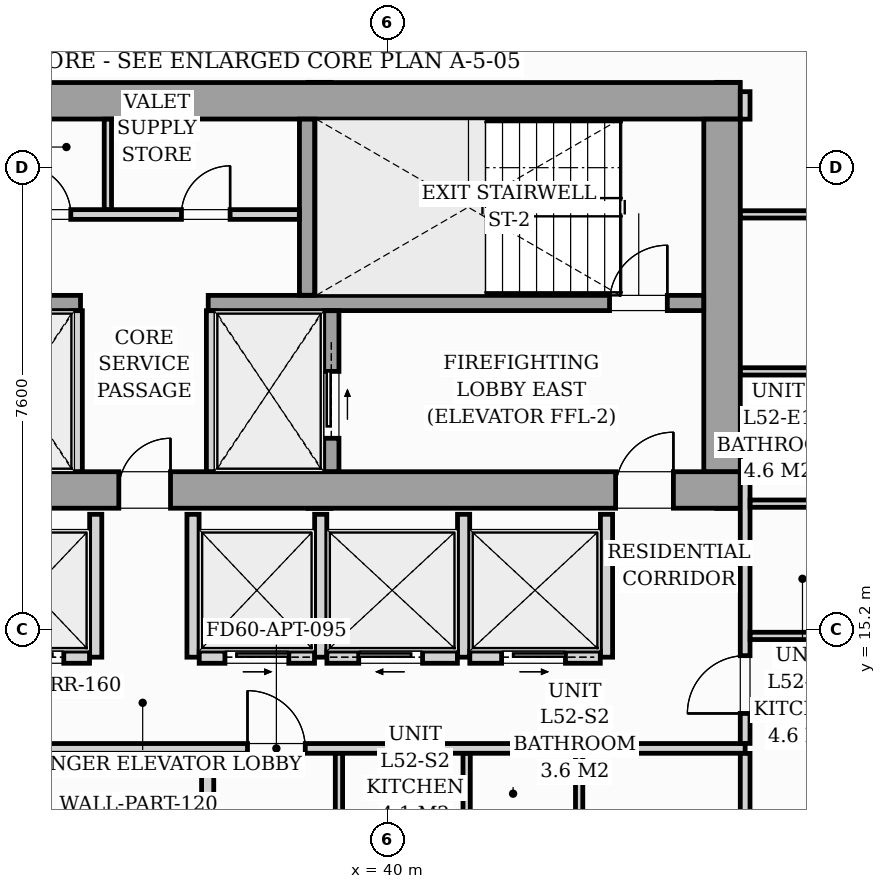
"""IFC4 building model, lengths in metres.
Left out: names, types, materials, properties, quantities, classifications, styles, units other than length and angle.
Written with IfcOpenShell. Run it as: python <this file> out.ifc"""

import sys

from ifc_helpers import new_model, si_unit, direction, frame, frame_2d, origin, origin_2d, place, context, subcontext, project, spatial, rectangle, i_section, extrude, source, transform, mapped, element, fill, save


model = new_model("IFC4")
c1 = context("Model", 3, precision=1e-05, world=origin(), true_north=direction((0.0, 1.0)))
c2 = subcontext(c1, "Body", "Model", "MODEL_VIEW")
j1 = project(units=[si_unit("LENGTHUNIT", "METRE"), si_unit("PLANEANGLEUNIT", "RADIAN")], contexts=[c1])
p1 = place(None, origin())
s1 = spatial("IfcSite", under=j1, at=p1, CompositionType="ELEMENT")
p2 = place(p1, origin())
s2 = spatial("IfcBuilding", under=s1, at=p2, CompositionType="ELEMENT")
p3 = place(p2, frame((0.0, 0.0, 182.6)))
s3 = spatial("IfcBuildingStorey", under=s2, at=p3, CompositionType="ELEMENT", Elevation=182.6)
m1 = source(origin(), c2, "Body", "SweptSolid", [
    extrude(i_section(OverallWidth=0.416, OverallDepth=0.446, WebThickness=0.039, FlangeThickness=0.063, FilletRadius=0.018, at=origin_2d()), origin(), (0.0, 0.0, 1.0), 3.196),
])
for number, where, z_axis, x_axis in (
    (1, (38.88, 17.4, 0.002), (0.0, 0.0, 1.0), (1.0, 0.0, 0.0)),
    (2, (45.6, 17.4, 0.002), (0.0, 0.0, 1.0), (1.0, 0.0, 0.0)),
    (3, (38.88, 24.0, 0.002), (0.0, 0.0, 1.0), (1.0, 0.0, 0.0)),
    (4, (45.6, 24.0, 0.002), (0.0, 0.0, 1.0), (1.0, 0.0, 0.0)),
):
    element("IfcColumn", number, at=place(p3, frame(where, z_axis=z_axis, x_axis=x_axis)), inside=s3, PredefinedType="PILASTER", context=c2, shape_type="MappedRepresentation", body=[
        mapped(m1, transform((0.0, 0.0, 0.0), scale=1.0)),
    ])
p4 = place(p3, frame((26.2, 17.5, 0.0), z_axis=(0.0, 0.0, 1.0), x_axis=(1.0, 0.0, 0.0)))
e5 = element("IfcWall", 5, at=p4, inside=s3, PredefinedType="SHEAR", context=c2, shape_type="SweptSolid", body=[
    extrude(rectangle(XDim=19.6, YDim=0.6, at=frame_2d((9.8, 0.0))), origin(), (0.0, 0.0, 1.0), 3.2),
])
p5 = place(p4, frame((0.95, 0.0, 0.0)))
e6 = element("IfcOpeningElement", 6, at=p5, cuts=e5, PredefinedType="OPENING", context=c2, shape_type="SweptSolid", body=[
    extrude(rectangle(XDim=0.95, YDim=2.06, at=frame_2d((0.475, 1.03))), frame((0.0, 0.31, 0.0), z_axis=(0.0, -1.0, 0.0), x_axis=(1.0, 0.0, 0.0)), (0.0, 0.0, 1.0), 0.62),
])
p6 = place(p4, frame((9.38, 0.0, 0.0)))
e7 = element("IfcOpeningElement", 7, at=p6, cuts=e5, PredefinedType="OPENING", context=c2, shape_type="SweptSolid", body=[
    extrude(rectangle(XDim=0.85, YDim=2.0, at=frame_2d((0.425, 1.0))), frame((0.0, 0.31, 0.0), z_axis=(0.0, -1.0, 0.0), x_axis=(1.0, 0.0, 0.0)), (0.0, 0.0, 1.0), 0.62),
])
p7 = place(p4, frame((17.55, 0.0, 0.0)))
e8 = element("IfcOpeningElement", 8, at=p7, cuts=e5, PredefinedType="OPENING", context=c2, shape_type="SweptSolid", body=[
    extrude(rectangle(XDim=0.95, YDim=2.06, at=frame_2d((0.475, 1.03))), frame((0.0, 0.31, 0.0), z_axis=(0.0, -1.0, 0.0), x_axis=(1.0, 0.0, 0.0)), (0.0, 0.0, 1.0), 0.62),
])
p8 = place(p3, frame((26.2, 23.9, 0.0), z_axis=(0.0, 0.0, 1.0), x_axis=(1.0, 0.0, 0.0)))
e9 = element("IfcWall", 9, at=p8, inside=s3, PredefinedType="SHEAR", context=c2, shape_type="SweptSolid", body=[
    extrude(rectangle(XDim=19.6, YDim=0.6, at=frame_2d((9.8, 0.0))), origin(), (0.0, 0.0, 1.0), 3.2),
])
p9 = place(p3, frame((45.5, 17.802, 0.0), z_axis=(0.0, 0.0, 1.0), x_axis=(0.0, 1.0, 0.0)))
e10 = element("IfcWall", 10, at=p9, inside=s3, PredefinedType="SHEAR", context=c2, shape_type="SweptSolid", body=[
    extrude(rectangle(XDim=5.796, YDim=0.6, at=frame_2d((2.898, 0.0))), origin(), (0.0, 0.0, 1.0), 3.2),
])
p10 = place(p3, frame((26.802, 20.575, 0.0), z_axis=(0.0, 0.0, 1.0), x_axis=(1.0, 0.0, 0.0)))
e11 = element("IfcWall", 11, at=p10, inside=s3, PredefinedType="SOLIDWALL", context=c2, shape_type="SweptSolid", body=[
    extrude(rectangle(XDim=8.148, YDim=0.25, at=frame_2d((4.074, 0.0))), origin(), (0.0, 0.0, 1.0), 3.2),
])
p11 = place(p10, frame((0.298, 0.0, 0.0)))
e12 = element("IfcOpeningElement", 12, at=p11, cuts=e11, PredefinedType="OPENING", context=c2, shape_type="SweptSolid", body=[
    extrude(rectangle(XDim=0.95, YDim=2.06, at=frame_2d((0.475, 1.03))), frame((0.0, 0.135, 0.0), z_axis=(0.0, -1.0, 0.0), x_axis=(1.0, 0.0, 0.0)), (0.0, 0.0, 1.0), 0.27),
])
p12 = place(p3, frame((37.05, 20.575, 0.0), z_axis=(0.0, 0.0, 1.0), x_axis=(1.0, 0.0, 0.0)))
e13 = element("IfcWall", 13, at=p12, inside=s3, PredefinedType="SOLIDWALL", context=c2, shape_type="SweptSolid", body=[
    extrude(rectangle(XDim=8.148, YDim=0.25, at=frame_2d((4.074, 0.0))), origin(), (0.0, 0.0, 1.0), 3.2),
])
p13 = place(p12, frame((6.6, 0.0, 0.0)))
e14 = element("IfcOpeningElement", 14, at=p13, cuts=e13, PredefinedType="OPENING", context=c2, shape_type="SweptSolid", body=[
    extrude(rectangle(XDim=0.95, YDim=2.06, at=frame_2d((0.475, 1.03))), frame((0.0, 0.135, 0.0), z_axis=(0.0, -1.0, 0.0), x_axis=(1.0, 0.0, 0.0)), (0.0, 0.0, 1.0), 0.27),
])
p14 = place(p3, frame((38.675, 20.702, 0.0), z_axis=(0.0, 0.0, 1.0), x_axis=(0.0, 1.0, 0.0)))
e15 = element("IfcWall", 15, at=p14, inside=s3, PredefinedType="SOLIDWALL", context=c2, shape_type="SweptSolid", body=[
    extrude(rectangle(XDim=2.896, YDim=0.25, at=frame_2d((1.448, 0.0))), origin(), (0.0, 0.0, 1.0), 3.2),
])
for number, where, z_axis, x_axis in (
    (16, (34.9, 17.802, 0.0), (0.0, 0.0, 1.0), (0.0, 1.0, 0.0)),
    (17, (37.1, 17.802, 0.0), (0.0, 0.0, 1.0), (0.0, 1.0, 0.0)),
):
    element("IfcWall", number, at=place(p3, frame(where, z_axis=z_axis, x_axis=x_axis)), inside=s3, PredefinedType="PARTITIONING", context=c2, shape_type="SweptSolid", body=[
        extrude(rectangle(XDim=2.646, YDim=0.16, at=frame_2d((1.323, 0.0))), origin(), (0.0, 0.0, 1.0), 2.94),
    ])
p15 = place(p3, frame((39.075, 17.802, 0.0), z_axis=(0.0, 0.0, 1.0), x_axis=(0.0, 1.0, 0.0)))
e18 = element("IfcWall", 18, at=p15, inside=s3, PredefinedType="SOLIDWALL", context=c2, shape_type="SweptSolid", body=[
    extrude(rectangle(XDim=2.646, YDim=0.25, at=frame_2d((1.323, 0.0))), origin(), (0.0, 0.0, 1.0), 3.2),
])
p16 = place(p15, frame((0.548, 0.0, 0.0)))
e19 = element("IfcOpeningElement", 19, at=p16, cuts=e18, PredefinedType="OPENING", context=c2, shape_type="SweptSolid", body=[
    extrude(rectangle(XDim=1.1, YDim=2.08, at=frame_2d((0.55, 1.04))), frame((0.0, 0.135, 0.0), z_axis=(0.0, -1.0, 0.0), x_axis=(1.0, 0.0, 0.0)), (0.0, 0.0, 1.0), 0.27),
])
p17 = place(p3, frame((33.452, 22.03, 0.0), z_axis=(0.0, 0.0, 1.0), x_axis=(1.0, 0.0, 0.0)))
e20 = element("IfcWall", 20, at=p17, inside=s3, PredefinedType="PARTITIONING", context=c2, shape_type="SweptSolid", body=[
    extrude(rectangle(XDim=5.096, YDim=0.16, at=frame_2d((2.548, 0.0))), origin(), (0.0, 0.0, 1.0), 2.94),
])
p18 = place(p17, frame((0.538, 0.0, 0.0)))
e21 = element("IfcOpeningElement", 21, at=p18, cuts=e20, PredefinedType="OPENING", context=c2, shape_type="SweptSolid", body=[
    extrude(rectangle(XDim=0.8, YDim=2.05, at=frame_2d((0.4, 1.025))), frame((0.0, 0.09, 0.0), z_axis=(0.0, -1.0, 0.0), x_axis=(1.0, 0.0, 0.0)), (0.0, 0.0, 1.0), 0.18),
])
p19 = place(p17, frame((3.158, 0.0, 0.0)))
e22 = element("IfcOpeningElement", 22, at=p19, cuts=e20, PredefinedType="OPENING", context=c2, shape_type="SweptSolid", body=[
    extrude(rectangle(XDim=0.8, YDim=2.05, at=frame_2d((0.4, 1.025))), frame((0.0, 0.09, 0.0), z_axis=(0.0, -1.0, 0.0), x_axis=(1.0, 0.0, 0.0)), (0.0, 0.0, 1.0), 0.18),
])
p20 = place(p3, frame((35.4, 22.112, 0.0), z_axis=(0.0, 0.0, 1.0), x_axis=(0.0, 1.0, 0.0)))
e23 = element("IfcWall", 23, at=p20, inside=s3, PredefinedType="PARTITIONING", context=c2, shape_type="SweptSolid", body=[
    extrude(rectangle(XDim=1.486, YDim=0.12, at=frame_2d((0.743, 0.0))), origin(), (0.0, 0.0, 1.0), 2.94),
])
p21 = place(p3, frame((35.2, 14.75, 0.0), z_axis=(0.0, 0.0, 1.0), x_axis=(0.0, 1.0, 0.0)))
e24 = element("IfcWall", 24, at=p21, inside=s3, PredefinedType="PARTITIONING", context=c2, shape_type="SweptSolid", body=[
    extrude(rectangle(XDim=2.35, YDim=0.2, at=frame_2d((1.175, 0.0))), origin(), (0.0, 0.0, 1.0), 2.94),
])
p22 = place(p3, frame((33.202, 14.75, 0.0), z_axis=(0.0, 0.0, 1.0), x_axis=(1.0, 0.0, 0.0)))
e25 = element("IfcWall", 25, at=p22, inside=s3, PredefinedType="PARTITIONING", context=c2, shape_type="SweptSolid", body=[
    extrude(rectangle(XDim=1.896, YDim=0.2, at=frame_2d((0.948, 0.0))), origin(), (0.0, 0.0, 1.0), 2.94),
])
p23 = place(p22, frame((0.423, 0.0, 0.0)))
e26 = element("IfcOpeningElement", 26, at=p23, cuts=e25, PredefinedType="OPENING", context=c2, shape_type="SweptSolid", body=[
    extrude(rectangle(XDim=1.05, YDim=2.08, at=frame_2d((0.525, 1.04))), frame((0.0, 0.11, 0.0), z_axis=(0.0, -1.0, 0.0), x_axis=(1.0, 0.0, 0.0)), (0.0, 0.0, 1.0), 0.22),
])
for number, where, z_axis, x_axis in (
    (27, (36.8, 14.75, 0.0), (0.0, 0.0, 1.0), (0.0, 1.0, 0.0)),
    (28, (38.9, 14.75, 0.0), (0.0, 0.0, 1.0), (0.0, 1.0, 0.0)),
):
    element("IfcWall", number, at=place(p3, frame(where, z_axis=z_axis, x_axis=x_axis)), inside=s3, PredefinedType="PARTITIONING", context=c2, shape_type="SweptSolid", body=[
        extrude(rectangle(XDim=2.35, YDim=0.2, at=frame_2d((1.175, 0.0))), origin(), (0.0, 0.0, 1.0), 2.94),
    ])
p24 = place(p3, frame((36.902, 14.75, 0.0), z_axis=(0.0, 0.0, 1.0), x_axis=(1.0, 0.0, 0.0)))
e29 = element("IfcWall", 29, at=p24, inside=s3, PredefinedType="PARTITIONING", context=c2, shape_type="SweptSolid", body=[
    extrude(rectangle(XDim=1.896, YDim=0.2, at=frame_2d((0.948, 0.0))), origin(), (0.0, 0.0, 1.0), 2.94),
])
p25 = place(p24, frame((0.423, 0.0, 0.0)))
e30 = element("IfcOpeningElement", 30, at=p25, cuts=e29, PredefinedType="OPENING", context=c2, shape_type="SweptSolid", body=[
    extrude(rectangle(XDim=1.05, YDim=2.08, at=frame_2d((0.525, 1.04))), frame((0.0, 0.11, 0.0), z_axis=(0.0, -1.0, 0.0), x_axis=(1.0, 0.0, 0.0)), (0.0, 0.0, 1.0), 0.22),
])
for number, where, z_axis, x_axis in (
    (31, (41.25, 14.75, 0.0), (0.0, 0.0, 1.0), (0.0, 1.0, 0.0)),
    (32, (43.6, 14.75, 0.0), (0.0, 0.0, 1.0), (0.0, 1.0, 0.0)),
):
    element("IfcWall", number, at=place(p3, frame(where, z_axis=z_axis, x_axis=x_axis)), inside=s3, PredefinedType="PARTITIONING", context=c2, shape_type="SweptSolid", body=[
        extrude(rectangle(XDim=2.35, YDim=0.2, at=frame_2d((1.175, 0.0))), origin(), (0.0, 0.0, 1.0), 2.94),
    ])
p26 = place(p3, frame((39.002, 14.75, 0.0), z_axis=(0.0, 0.0, 1.0), x_axis=(1.0, 0.0, 0.0)))
e33 = element("IfcWall", 33, at=p26, inside=s3, PredefinedType="PARTITIONING", context=c2, shape_type="SweptSolid", body=[
    extrude(rectangle(XDim=2.146, YDim=0.2, at=frame_2d((1.073, 0.0))), origin(), (0.0, 0.0, 1.0), 2.94),
])
p27 = place(p26, frame((0.523, 0.0, 0.0)))
e34 = element("IfcOpeningElement", 34, at=p27, cuts=e33, PredefinedType="OPENING", context=c2, shape_type="SweptSolid", body=[
    extrude(rectangle(XDim=1.05, YDim=2.08, at=frame_2d((0.525, 1.04))), frame((0.0, 0.11, 0.0), z_axis=(0.0, -1.0, 0.0), x_axis=(1.0, 0.0, 0.0)), (0.0, 0.0, 1.0), 0.22),
])
p28 = place(p3, frame((41.352, 14.75, 0.0), z_axis=(0.0, 0.0, 1.0), x_axis=(1.0, 0.0, 0.0)))
e35 = element("IfcWall", 35, at=p28, inside=s3, PredefinedType="PARTITIONING", context=c2, shape_type="SweptSolid", body=[
    extrude(rectangle(XDim=2.146, YDim=0.2, at=frame_2d((1.073, 0.0))), origin(), (0.0, 0.0, 1.0), 2.94),
])
p29 = place(p28, frame((0.523, 0.0, 0.0)))
e36 = element("IfcOpeningElement", 36, at=p29, cuts=e35, PredefinedType="OPENING", context=c2, shape_type="SweptSolid", body=[
    extrude(rectangle(XDim=1.05, YDim=2.08, at=frame_2d((0.525, 1.04))), frame((0.0, 0.11, 0.0), z_axis=(0.0, -1.0, 0.0), x_axis=(1.0, 0.0, 0.0)), (0.0, 0.0, 1.0), 0.22),
])
p30 = place(p3, frame((22.6, 13.25, 0.0), z_axis=(0.0, 0.0, 1.0), x_axis=(1.0, 0.0, 0.0)))
e37 = element("IfcWall", 37, at=p30, inside=s3, PredefinedType="PARTITIONING", context=c2, shape_type="SweptSolid", body=[
    extrude(rectangle(XDim=23.28, YDim=0.16, at=frame_2d((11.64, 0.0))), origin(), (0.0, 0.0, 1.0), 2.94),
])
p31 = place(p30, frame((3.335, 0.0, 0.0)))
e38 = element("IfcOpeningElement", 38, at=p31, cuts=e37, PredefinedType="OPENING", context=c2, shape_type="SweptSolid", body=[
    extrude(rectangle(XDim=0.95, YDim=2.06, at=frame_2d((0.475, 1.03))), frame((0.0, 0.09, 0.0), z_axis=(0.0, -1.0, 0.0), x_axis=(1.0, 0.0, 0.0)), (0.0, 0.0, 1.0), 0.18),
])
p32 = place(p30, frame((15.096, 0.0, 0.0)))
e39 = element("IfcOpeningElement", 39, at=p32, cuts=e37, PredefinedType="OPENING", context=c2, shape_type="SweptSolid", body=[
    extrude(rectangle(XDim=0.95, YDim=2.06, at=frame_2d((0.475, 1.03))), frame((0.0, 0.09, 0.0), z_axis=(0.0, -1.0, 0.0), x_axis=(1.0, 0.0, 0.0)), (0.0, 0.0, 1.0), 0.18),
])
p33 = place(p3, frame((45.88, 8.981, 0.0), z_axis=(0.0, 0.0, 1.0), x_axis=(0.0, 1.0, 0.0)))
e40 = element("IfcWall", 40, at=p33, inside=s3, PredefinedType="PARTITIONING", context=c2, shape_type="SweptSolid", body=[
    extrude(rectangle(XDim=4.187, YDim=0.16, at=frame_2d((2.094, 0.0))), origin(), (0.0, 0.0, 1.0), 2.94),
])
p34 = place(p3, frame((45.88, 13.332, 0.0), z_axis=(0.0, 0.0, 1.0), x_axis=(0.0, 1.0, 0.0)))
e41 = element("IfcWall", 41, at=p34, inside=s3, PredefinedType="PARTITIONING", context=c2, shape_type="SweptSolid", body=[
    extrude(rectangle(XDim=4.47, YDim=0.16, at=frame_2d((2.235, 0.0))), origin(), (0.0, 0.0, 1.0), 2.94),
])
p35 = place(p34, frame((0.493, 0.0, 0.0)))
e42 = element("IfcOpeningElement", 42, at=p35, cuts=e41, PredefinedType="OPENING", context=c2, shape_type="SweptSolid", body=[
    extrude(rectangle(XDim=0.95, YDim=2.06, at=frame_2d((0.475, 1.03))), frame((0.0, 0.09, 0.0), z_axis=(0.0, -1.0, 0.0), x_axis=(1.0, 0.0, 0.0)), (0.0, 0.0, 1.0), 0.18),
])
p36 = place(p3, frame((45.88, 23.598, 0.0), z_axis=(0.0, 0.0, 1.0), x_axis=(0.0, 1.0, 0.0)))
e43 = element("IfcWall", 43, at=p36, inside=s3, PredefinedType="PARTITIONING", context=c2, shape_type="SweptSolid", body=[
    extrude(rectangle(XDim=0.452, YDim=0.16, at=frame_2d((0.226, 0.0))), origin(), (0.0, 0.0, 1.0), 2.94),
])
p37 = place(p3, frame((37.041, 8.13, 0.0), z_axis=(0.0, 0.0, 1.0), x_axis=(0.0, 1.0, 0.0)))
e44 = element("IfcWall", 44, at=p37, inside=s3, PredefinedType="PARTITIONING", context=c2, shape_type="SweptSolid", body=[
    extrude(rectangle(XDim=5.038, YDim=0.2, at=frame_2d((2.519, 0.0))), origin(), (0.0, 0.0, 1.0), 2.94),
])
p38 = place(p3, frame((43.15, 8.718, 0.0), z_axis=(0.0, 0.0, 1.0), x_axis=(0.0, 1.0, 0.0)))
e45 = element("IfcWall", 45, at=p38, inside=s3, PredefinedType="PARTITIONING", context=c2, shape_type="SweptSolid", body=[
    extrude(rectangle(XDim=4.45, YDim=0.12, at=frame_2d((2.225, 0.0))), origin(), (0.0, 0.0, 1.0), 2.94),
])
p39 = place(p38, frame((2.386, 0.0, 0.0)))
e46 = element("IfcOpeningElement", 46, at=p39, cuts=e45, PredefinedType="OPENING", context=c2, shape_type="SweptSolid", body=[
    extrude(rectangle(XDim=0.9, YDim=2.05, at=frame_2d((0.45, 1.025))), frame((0.0, 0.07, 0.0), z_axis=(0.0, -1.0, 0.0), x_axis=(1.0, 0.0, 0.0)), (0.0, 0.0, 1.0), 0.14),
])
p40 = place(p3, frame((41.3, 11.09, 0.0), z_axis=(0.0, 0.0, 1.0), x_axis=(0.0, 1.0, 0.0)))
e47 = element("IfcWall", 47, at=p40, inside=s3, PredefinedType="PARTITIONING", context=c2, shape_type="SweptSolid", body=[
    extrude(rectangle(XDim=2.078, YDim=0.12, at=frame_2d((1.039, 0.0))), origin(), (0.0, 0.0, 1.0), 2.94),
])
p41 = place(p3, frame((39.2, 11.09, 0.0), z_axis=(0.0, 0.0, 1.0), x_axis=(0.0, 1.0, 0.0)))
e48 = element("IfcWall", 48, at=p41, inside=s3, PredefinedType="PARTITIONING", context=c2, shape_type="SweptSolid", body=[
    extrude(rectangle(XDim=2.078, YDim=0.12, at=frame_2d((1.039, 0.0))), origin(), (0.0, 0.0, 1.0), 2.94),
])
p42 = place(p41, frame((0.18, 0.0, 0.0)))
e49 = element("IfcOpeningElement", 49, at=p42, cuts=e48, PredefinedType="OPENING", context=c2, shape_type="SweptSolid", body=[
    extrude(rectangle(XDim=0.85, YDim=2.05, at=frame_2d((0.425, 1.025))), frame((0.0, 0.07, 0.0), z_axis=(0.0, -1.0, 0.0), x_axis=(1.0, 0.0, 0.0)), (0.0, 0.0, 1.0), 0.14),
])
for number, where, z_axis, x_axis in (
    (50, (45.962, 17.275, 0.0), (0.0, 0.0, 1.0), (1.0, 0.0, 0.0)),
    (51, (45.962, 15.1, 0.0), (0.0, 0.0, 1.0), (1.0, 0.0, 0.0)),
):
    element("IfcWall", number, at=place(p3, frame(where, z_axis=z_axis, x_axis=x_axis)), inside=s3, PredefinedType="PARTITIONING", context=c2, shape_type="SweptSolid", body=[
        extrude(rectangle(XDim=2.256, YDim=0.12, at=frame_2d((1.128, 0.0))), origin(), (0.0, 0.0, 1.0), 2.94),
    ])
p43 = place(p3, frame((45.802, 19.45, 0.0), z_axis=(0.0, 0.0, 1.0), x_axis=(1.0, 0.0, 0.0)))
e52 = element("IfcWall", 52, at=p43, inside=s3, PredefinedType="PARTITIONING", context=c2, shape_type="SweptSolid", body=[
    extrude(rectangle(XDim=2.416, YDim=0.12, at=frame_2d((1.208, 0.0))), origin(), (0.0, 0.0, 1.0), 2.94),
])
p44 = place(p3, frame((45.802, 22.032, 0.0), z_axis=(0.0, 0.0, 1.0), x_axis=(1.0, 0.0, 0.0)))
e53 = element("IfcWall", 53, at=p44, inside=s3, PredefinedType="PARTITIONING", context=c2, shape_type="SweptSolid", body=[
    extrude(rectangle(XDim=18.499, YDim=0.12, at=frame_2d((9.25, 0.0))), origin(), (0.0, 0.0, 1.0), 2.94),
])
p45 = place(p44, frame((8.911, 0.0, 0.0)))
e54 = element("IfcOpeningElement", 54, at=p45, cuts=e53, PredefinedType="OPENING", context=c2, shape_type="SweptSolid", body=[
    extrude(rectangle(XDim=0.85, YDim=2.05, at=frame_2d((0.425, 1.025))), frame((0.0, 0.07, 0.0), z_axis=(0.0, -1.0, 0.0), x_axis=(1.0, 0.0, 0.0)), (0.0, 0.0, 1.0), 0.14),
])
m2 = source(origin(), c2, "Body", "SweptSolid", [
    extrude(rectangle(XDim=0.85, YDim=2.0, at=frame_2d((0.425, 1.0))), frame((0.0, 0.025, 0.0), z_axis=(0.0, -1.0, 0.0), x_axis=(1.0, 0.0, 0.0)), (0.0, 0.0, 1.0), 0.05),
])
p46 = place(p6, origin())
e55 = element("IfcDoor", 55, at=p46, inside=s3, OperationType="SINGLE_SWING_RIGHT", PredefinedType="DOOR", context=c2, shape_type="MappedRepresentation", body=[
    mapped(m2, transform((0.0, 0.0, 0.0), scale=1.0)),
])
fill(e7, e55)
m3 = source(origin(), c2, "Body", "SweptSolid", [
    extrude(rectangle(XDim=0.95, YDim=2.06, at=frame_2d((0.475, 1.03))), frame((0.0, 0.025, 0.0), z_axis=(0.0, -1.0, 0.0), x_axis=(1.0, 0.0, 0.0)), (0.0, 0.0, 1.0), 0.05),
])
p47 = place(p7, origin())
e56 = element("IfcDoor", 56, at=p47, inside=s3, OperationType="SINGLE_SWING_RIGHT", PredefinedType="DOOR", context=c2, shape_type="MappedRepresentation", body=[
    mapped(m3, transform((0.0, 0.0, 0.0), scale=1.0)),
])
fill(e8, e56)
p48 = place(p13, origin())
e57 = element("IfcDoor", 57, at=p48, inside=s3, OperationType="SINGLE_SWING_RIGHT", PredefinedType="DOOR", context=c2, shape_type="MappedRepresentation", body=[
    mapped(m3, transform((0.0, 0.0, 0.0), scale=1.0)),
])
fill(e14, e57)
m4 = source(origin(), c2, "Body", "SweptSolid", [
    extrude(rectangle(XDim=1.1, YDim=2.08, at=frame_2d((0.55, 1.04))), frame((0.0, 0.025, 0.0), z_axis=(0.0, -1.0, 0.0), x_axis=(1.0, 0.0, 0.0)), (0.0, 0.0, 1.0), 0.05),
])
p49 = place(p16, origin())
e58 = element("IfcDoor", 58, at=p49, inside=s3, OperationType="SLIDING_TO_RIGHT", PredefinedType="DOOR", context=c2, shape_type="MappedRepresentation", body=[
    mapped(m4, transform((0.0, 0.0, 0.0), scale=1.0)),
])
fill(e19, e58)
m5 = source(origin(), c2, "Body", "SweptSolid", [
    extrude(rectangle(XDim=0.8, YDim=2.05, at=frame_2d((0.4, 1.025))), frame((0.0, 0.025, 0.0), z_axis=(0.0, -1.0, 0.0), x_axis=(1.0, 0.0, 0.0)), (0.0, 0.0, 1.0), 0.05),
])
p50 = place(p18, origin())
e59 = element("IfcDoor", 59, at=p50, inside=s3, OperationType="SINGLE_SWING_LEFT", PredefinedType="DOOR", context=c2, shape_type="MappedRepresentation", body=[
    mapped(m5, transform((0.0, 0.0, 0.0), scale=1.0)),
])
fill(e21, e59)
p51 = place(p19, origin())
e60 = element("IfcDoor", 60, at=p51, inside=s3, OperationType="SINGLE_SWING_RIGHT", PredefinedType="DOOR", context=c2, shape_type="MappedRepresentation", body=[
    mapped(m5, transform((0.0, 0.0, 0.0), scale=1.0)),
])
fill(e22, e60)
m6 = source(origin(), c2, "Body", "SweptSolid", [
    extrude(rectangle(XDim=1.05, YDim=2.08, at=frame_2d((0.525, 1.04))), frame((0.0, 0.025, 0.0), z_axis=(0.0, -1.0, 0.0), x_axis=(1.0, 0.0, 0.0)), (0.0, 0.0, 1.0), 0.05),
])
p52 = place(p23, origin())
e61 = element("IfcDoor", 61, at=p52, inside=s3, OperationType="SLIDING_TO_LEFT", PredefinedType="DOOR", context=c2, shape_type="MappedRepresentation", body=[
    mapped(m6, transform((0.0, 0.0, 0.0), scale=1.0)),
])
fill(e26, e61)
p53 = place(p25, origin())
e62 = element("IfcDoor", 62, at=p53, inside=s3, OperationType="SLIDING_TO_RIGHT", PredefinedType="DOOR", context=c2, shape_type="MappedRepresentation", body=[
    mapped(m6, transform((0.0, 0.0, 0.0), scale=1.0)),
])
fill(e30, e62)
p54 = place(p27, origin())
e63 = element("IfcDoor", 63, at=p54, inside=s3, OperationType="SLIDING_TO_LEFT", PredefinedType="DOOR", context=c2, shape_type="MappedRepresentation", body=[
    mapped(m6, transform((0.0, 0.0, 0.0), scale=1.0)),
])
fill(e34, e63)
p55 = place(p29, origin())
e64 = element("IfcDoor", 64, at=p55, inside=s3, OperationType="SLIDING_TO_RIGHT", PredefinedType="DOOR", context=c2, shape_type="MappedRepresentation", body=[
    mapped(m6, transform((0.0, 0.0, 0.0), scale=1.0)),
])
fill(e36, e64)
m7 = source(origin(), c2, "Body", "SweptSolid", [
    extrude(rectangle(XDim=0.95, YDim=2.06, at=frame_2d((0.475, 1.03))), frame((0.0, 0.025, 0.0), z_axis=(0.0, -1.0, 0.0), x_axis=(1.0, 0.0, 0.0)), (0.0, 0.0, 1.0), 0.05),
])
p56 = place(p32, origin())
e65 = element("IfcDoor", 65, at=p56, inside=s3, OperationType="SINGLE_SWING_LEFT", PredefinedType="DOOR", context=c2, shape_type="MappedRepresentation", body=[
    mapped(m7, transform((0.0, 0.0, 0.0), scale=1.0)),
])
fill(e39, e65)
p57 = place(p35, origin())
e66 = element("IfcDoor", 66, at=p57, inside=s3, OperationType="SINGLE_SWING_LEFT", PredefinedType="DOOR", context=c2, shape_type="MappedRepresentation", body=[
    mapped(m7, transform((0.0, 0.0, 0.0), scale=1.0)),
])
fill(e42, e66)
save(model, sys.argv[1])
